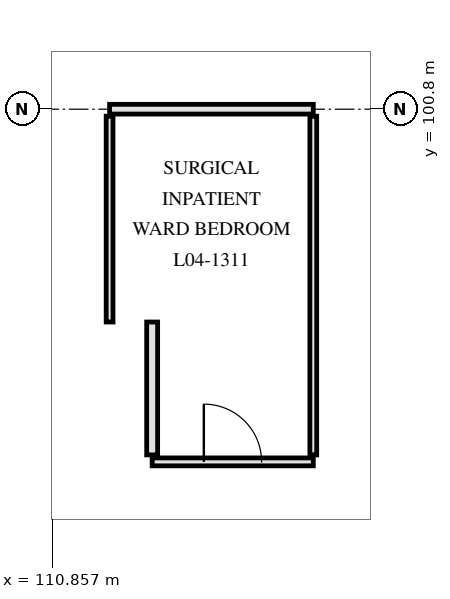
"""IFC4 building model, lengths in metres.
Left out: names, types, materials, properties, quantities, classifications, styles, units other than length and angle.
Written with IfcOpenShell. Run it as: python <this file> out.ifc"""

import sys

from ifc_helpers import new_model, si_unit, direction, frame, frame_2d, origin, place, context, subcontext, project, spatial, rectangle, extrude, element, fill, save


model = new_model("IFC4")
c1 = context("Model", 3, precision=1e-05, world=origin(), true_north=direction((0.0, 1.0)))
c2 = subcontext(c1, "Body", "Model", "MODEL_VIEW")
j1 = project(units=[si_unit("LENGTHUNIT", "METRE"), si_unit("PLANEANGLEUNIT", "RADIAN")], contexts=[c1])
p1 = place(None, origin())
s1 = spatial("IfcSite", under=j1, at=p1, CompositionType="ELEMENT")
p2 = place(p1, origin())
s2 = spatial("IfcBuilding", under=s1, at=p2, CompositionType="ELEMENT")
p3 = place(p2, frame((0.0, 0.0, 18.6)))
s3 = spatial("IfcBuildingStorey", under=s2, at=p3, CompositionType="ELEMENT", Elevation=18.6)
p4 = place(p3, frame((112.5, 95.0, 0.0), z_axis=(0.0, 0.0, 1.0), x_axis=(1.0, 0.0, 0.0)))
e1 = element("IfcWall", 1, at=p4, inside=s3, PredefinedType="PARTITIONING", context=c2, shape_type="SweptSolid", body=[
    extrude(rectangle(XDim=2.65, YDim=0.13, at=frame_2d((1.325, 0.0))), origin(), (0.0, 0.0, 1.0), 3.61),
])
p5 = place(p4, frame((0.85, 0.0, 0.0)))
e2 = element("IfcOpeningElement", 2, at=p5, cuts=e1, PredefinedType="OPENING", context=c2, shape_type="SweptSolid", body=[
    extrude(rectangle(XDim=0.95, YDim=2.1, at=frame_2d((0.475, 1.05))), frame((0.0, 0.075, 0.0), z_axis=(0.0, -1.0, 0.0), x_axis=(1.0, 0.0, 0.0)), (0.0, 0.0, 1.0), 0.15),
])
p6 = place(p3, frame((111.8, 100.8, 0.0), z_axis=(0.0, 0.0, 1.0), x_axis=(1.0, 0.0, 0.0)))
e3 = element("IfcWall", 3, at=p6, inside=s3, PredefinedType="PARTITIONING", context=c2, shape_type="SweptSolid", body=[
    extrude(rectangle(XDim=3.35, YDim=0.16, at=frame_2d((1.675, 0.0))), origin(), (0.0, 0.0, 1.0), 3.16),
])
p7 = place(p3, frame((111.8, 97.3, 0.0), z_axis=(0.0, 0.0, 1.0), x_axis=(0.0, 1.0, 0.0)))
e4 = element("IfcWall", 4, at=p7, inside=s3, PredefinedType="PARTITIONING", context=c2, shape_type="SweptSolid", body=[
    extrude(rectangle(XDim=3.385, YDim=0.112, at=frame_2d((1.692, 0.0))), origin(), (0.0, 0.0, 1.0), 3.31),
])
p8 = place(p3, frame((112.5, 95.115, 0.0), z_axis=(0.0, 0.0, 1.0), x_axis=(0.0, 1.0, 0.0)))
e5 = element("IfcWall", 5, at=p8, inside=s3, PredefinedType="PARTITIONING", context=c2, shape_type="SweptSolid", body=[
    extrude(rectangle(XDim=2.185, YDim=0.18, at=frame_2d((1.093, 0.0))), origin(), (0.0, 0.0, 1.0), 3.31),
])
p9 = place(p3, frame((115.15, 95.115, 0.0), z_axis=(0.0, 0.0, 1.0), x_axis=(0.0, 1.0, 0.0)))
e6 = element("IfcWall", 6, at=p9, inside=s3, PredefinedType="PARTITIONING", context=c2, shape_type="SweptSolid", body=[
    extrude(rectangle(XDim=5.57, YDim=0.112, at=frame_2d((2.785, 0.0))), origin(), (0.0, 0.0, 1.0), 3.31),
])
p10 = place(p5, origin())
e7 = element("IfcDoor", 7, at=p10, inside=s3, OperationType="SINGLE_SWING_LEFT", PredefinedType="DOOR", context=c2, shape_type="SweptSolid", body=[
    extrude(rectangle(XDim=0.95, YDim=2.1, at=frame_2d((0.475, 1.05))), frame((0.0, 0.025, 0.0), z_axis=(0.0, -1.0, 0.0), x_axis=(1.0, 0.0, 0.0)), (0.0, 0.0, 1.0), 0.05),
])
fill(e2, e7)
save(model, sys.argv[1])
